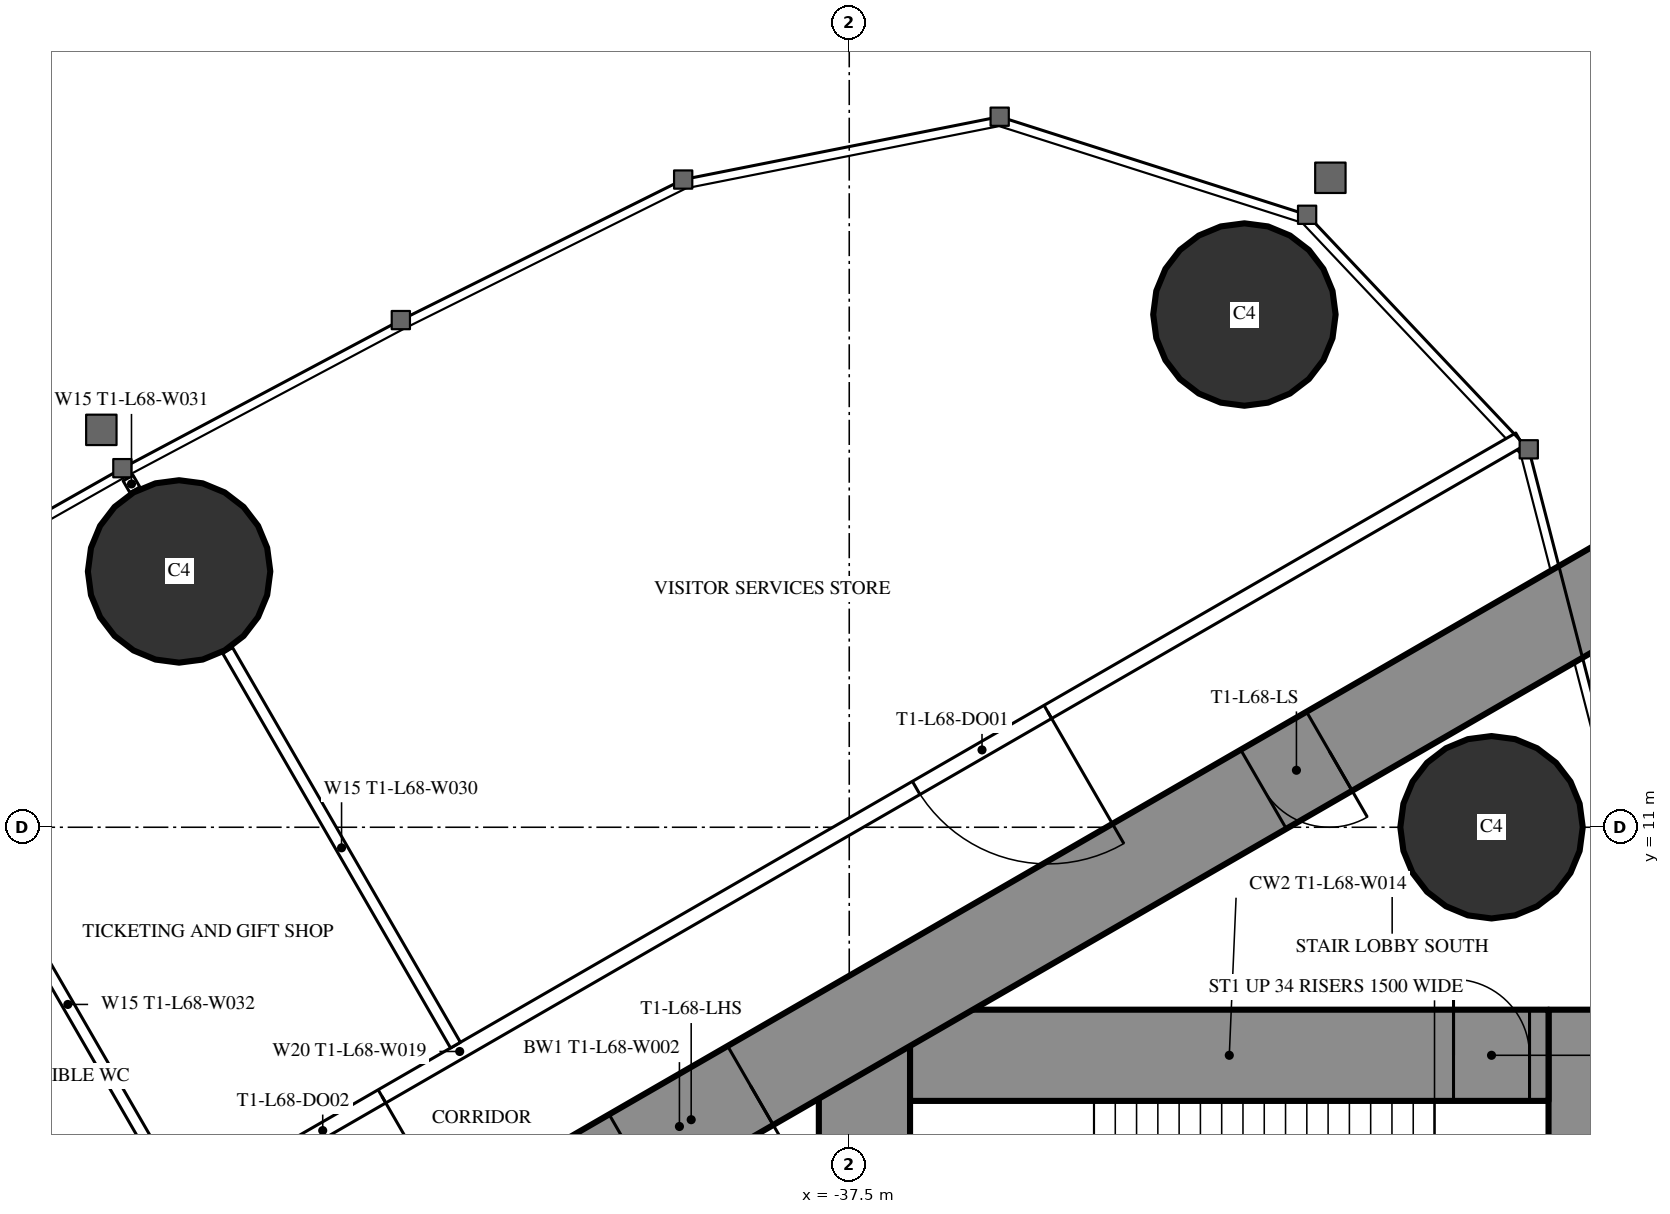
"""IFC4 building model, lengths in metres.
Left out: names, types, materials, properties, quantities, classifications, styles, units other than length and angle.
Written with IfcOpenShell. Run it as: python <this file> out.ifc"""

import sys

from ifc_helpers import new_model, si_unit, direction, frame, frame_2d, origin, origin_2d, place, context, subcontext, project, spatial, rectangle, circle, extrude, element, fill, save


model = new_model("IFC4")
c1 = context("Model", 3, precision=1e-05, world=origin(), true_north=direction((0.0, 1.0)))
c2 = subcontext(c1, "Body", "Model", "MODEL_VIEW")
j1 = project(units=[si_unit("LENGTHUNIT", "METRE"), si_unit("PLANEANGLEUNIT", "RADIAN")], contexts=[c1])
p1 = place(None, origin())
s1 = spatial("IfcSite", under=j1, at=p1, CompositionType="ELEMENT")
p2 = place(p1, origin())
s2 = spatial("IfcBuilding", under=s1, at=p2, CompositionType="ELEMENT")
p3 = place(p2, frame((0.0, 0.0, 257.3)))
s3 = spatial("IfcBuildingStorey", under=s2, at=p3, CompositionType="ELEMENT", Elevation=257.3)
for number, where, z_axis, x_axis in (
    (1, (-32.301, 17.745, 0.0), (0.0, 0.0, 1.0), (1.0, 0.0, 0.0)),
    (2, (-29.05, 11.0, 0.0), (0.0, 0.0, 1.0), (1.0, 0.0, 0.0)),
    (3, (-46.317, 14.365, 0.0), (0.0, 0.0, 1.0), (1.0, 0.0, 0.0)),
):
    element("IfcColumn", number, at=place(p3, frame(where, z_axis=z_axis, x_axis=x_axis)), inside=s3, PredefinedType="COLUMN", context=c2, shape_type="SweptSolid", body=[
        extrude(circle(Radius=1.2, at=origin_2d()), origin(), (0.0, 0.0, 1.0), 6.0),
    ])
p4 = place(p3, frame((-27.9, 8.6, 0.0), z_axis=(0.0, 0.0, 1.0), x_axis=(0.0, -1.0, 0.0)))
e4 = element("IfcWall", 4, at=p4, inside=s3, PredefinedType="SHEAR", context=c2, shape_type="SweptSolid", body=[
    extrude(rectangle(XDim=17.2, YDim=0.8, at=frame_2d((8.6, 0.0))), origin(), (0.0, 0.0, 1.0), 6.0),
])
p5 = place(p4, frame((6.95, 0.0, 0.0)))
e5 = element("IfcOpeningElement", 5, at=p5, cuts=e4, PredefinedType="OPENING", context=c2, shape_type="SweptSolid", body=[
    extrude(rectangle(XDim=0.9, YDim=2.2, at=frame_2d((0.45, 1.1))), frame((0.0, 0.41, 0.0), z_axis=(0.0, -1.0, 0.0), x_axis=(1.0, 0.0, 0.0)), (0.0, 0.0, 1.0), 0.82),
])
p6 = place(p3, frame((-37.3, 8.6, 0.0), z_axis=(0.0, 0.0, 1.0), x_axis=(0.0, -1.0, 0.0)))
e6 = element("IfcWall", 6, at=p6, inside=s3, PredefinedType="SHEAR", context=c2, shape_type="SweptSolid", body=[
    extrude(rectangle(XDim=17.2, YDim=1.2, at=frame_2d((8.6, 0.0))), origin(), (0.0, 0.0, 1.0), 6.0),
])
p7 = place(p6, frame((7.7, 0.0, 0.0)))
e7 = element("IfcOpeningElement", 7, at=p7, cuts=e6, PredefinedType="OPENING", context=c2, shape_type="SweptSolid", body=[
    extrude(rectangle(XDim=1.8, YDim=2.2, at=frame_2d((0.9, 1.1))), frame((0.0, 0.61, 0.0), z_axis=(0.0, -1.0, 0.0), x_axis=(1.0, 0.0, 0.0)), (0.0, 0.0, 1.0), 1.22),
])
p8 = place(p3, frame((-28.3, 8.0, 0.0), z_axis=(0.0, 0.0, 1.0), x_axis=(-1.0, 0.0, 0.0)))
e8 = element("IfcWall", 8, at=p8, inside=s3, PredefinedType="SHEAR", context=c2, shape_type="SweptSolid", body=[
    extrude(rectangle(XDim=8.4, YDim=1.2, at=frame_2d((4.2, 0.0))), origin(), (0.0, 0.0, 1.0), 6.0),
])
p9 = place(p8, frame((0.25, 0.0, 0.0)))
e9 = element("IfcOpeningElement", 9, at=p9, cuts=e8, PredefinedType="OPENING", context=c2, shape_type="SweptSolid", body=[
    extrude(rectangle(XDim=1.0, YDim=2.2, at=frame_2d((0.5, 1.1))), frame((0.0, 0.61, 0.0), z_axis=(0.0, -1.0, 0.0), x_axis=(1.0, 0.0, 0.0)), (0.0, 0.0, 1.0), 1.22),
])
p10 = place(p3, frame((-27.2, 14.3, 0.0), z_axis=(0.0, 0.0, 1.0), x_axis=(-0.866026593062, -0.499997940104, 0.0)))
e10 = element("IfcWall", 10, at=p10, inside=s3, PredefinedType="SHEAR", context=c2, shape_type="SweptSolid", body=[
    extrude(rectangle(XDim=28.946, YDim=1.2, at=frame_2d((14.473, 0.0))), origin(), (0.0, 0.0, 1.0), 6.0),
])
p11 = place(p10, frame((4.6, 0.0, 0.0)))
e11 = element("IfcOpeningElement", 11, at=p11, cuts=e10, PredefinedType="OPENING", context=c2, shape_type="SweptSolid", body=[
    extrude(rectangle(XDim=1.0, YDim=2.2, at=frame_2d((0.5, 1.1))), frame((0.0, 0.61, 0.0), z_axis=(0.0, -1.0, 0.0), x_axis=(1.0, 0.0, 0.0)), (0.0, 0.0, 1.0), 1.22),
])
p12 = place(p10, frame((13.395, 0.0, 0.0)))
e12 = element("IfcOpeningElement", 12, at=p12, cuts=e10, PredefinedType="OPENING", context=c2, shape_type="SweptSolid", body=[
    extrude(rectangle(XDim=1.8, YDim=2.2, at=frame_2d((0.9, 1.1))), frame((0.0, 0.61, 0.0), z_axis=(0.0, -1.0, 0.0), x_axis=(1.0, 0.0, 0.0)), (0.0, 0.0, 1.0), 1.22),
])
p13 = place(p3, frame((-28.681, 16.101, 0.0), z_axis=(0.0, 0.0, 1.0), x_axis=(-0.866024860443, -0.500000941094, 0.0)))
e13 = element("IfcWall", 13, at=p13, inside=s3, PredefinedType="PARTITIONING", context=c2, shape_type="SweptSolid", body=[
    extrude(rectangle(XDim=32.201, YDim=0.2, at=frame_2d((16.101, 0.0))), origin(), (0.0, 0.0, 1.0), 5.75),
])
p14 = place(p13, frame((7.166, 0.0, 0.0)))
e14 = element("IfcOpeningElement", 14, at=p14, cuts=e13, PredefinedType="OPENING", context=c2, shape_type="SweptSolid", body=[
    extrude(rectangle(XDim=2.0, YDim=2.4, at=frame_2d((1.0, 1.2))), frame((0.0, 0.11, 0.0), z_axis=(0.0, -1.0, 0.0), x_axis=(1.0, 0.0, 0.0)), (0.0, 0.0, 1.0), 0.22),
])
p15 = place(p13, frame((17.281, 0.0, 0.0)))
e15 = element("IfcOpeningElement", 15, at=p15, cuts=e13, PredefinedType="OPENING", context=c2, shape_type="SweptSolid", body=[
    extrude(rectangle(XDim=1.8, YDim=2.2, at=frame_2d((0.9, 1.1))), frame((0.0, 0.11, 0.0), z_axis=(0.0, -1.0, 0.0), x_axis=(1.0, 0.0, 0.0)), (0.0, 0.0, 1.0), 0.22),
])
p16 = place(p13, frame((21.43, 0.0, 0.0)))
e16 = element("IfcOpeningElement", 16, at=p16, cuts=e13, PredefinedType="OPENING", context=c2, shape_type="SweptSolid", body=[
    extrude(rectangle(XDim=1.8, YDim=2.2, at=frame_2d((0.9, 1.1))), frame((0.0, 0.11, 0.0), z_axis=(0.0, -1.0, 0.0), x_axis=(1.0, 0.0, 0.0)), (0.0, 0.0, 1.0), 0.22),
])
p17 = place(p13, frame((27.19, 0.0, 0.0)))
e17 = element("IfcOpeningElement", 17, at=p17, cuts=e13, PredefinedType="OPENING", context=c2, shape_type="SweptSolid", body=[
    extrude(rectangle(XDim=2.0, YDim=2.4, at=frame_2d((1.0, 1.2))), frame((0.0, 0.11, 0.0), z_axis=(0.0, -1.0, 0.0), x_axis=(1.0, 0.0, 0.0)), (0.0, 0.0, 1.0), 0.22),
])
p18 = place(p3, frame((-42.68, 8.134, 0.0), z_axis=(0.0, 0.0, 1.0), x_axis=(-0.499984479505, 0.866034364361, 0.0)))
e18 = element("IfcWall", 18, at=p18, inside=s3, PredefinedType="PARTITIONING", context=c2, shape_type="SweptSolid", body=[
    extrude(rectangle(XDim=5.995, YDim=0.15, at=frame_2d((2.998, 0.0))), origin(), (0.0, 0.0, 1.0), 4.85),
])
p19 = place(p3, frame((-46.898, 15.439, 0.0), z_axis=(0.0, 0.0, 1.0), x_axis=(-0.500232303069, 0.865891241997, 0.0)))
e19 = element("IfcWall", 19, at=p19, inside=s3, PredefinedType="PARTITIONING", context=c2, shape_type="SweptSolid", body=[
    extrude(rectangle(XDim=0.18, YDim=0.15, at=frame_2d((0.09, 0.0))), origin(), (0.0, 0.0, 1.0), 4.85),
])
p20 = place(p3, frame((-46.274, 6.059, 0.0), z_axis=(0.0, 0.0, 1.0), x_axis=(-0.500020471368, 0.866013584312, 0.0)))
e20 = element("IfcWall", 20, at=p20, inside=s3, PredefinedType="PARTITIONING", context=c2, shape_type="SweptSolid", body=[
    extrude(rectangle(XDim=6.028, YDim=0.15, at=frame_2d((3.014, 0.0))), origin(), (0.0, 0.0, 1.0), 4.85),
])
p21 = place(p14, origin())
e21 = element("IfcDoor", 21, at=p21, inside=s3, OperationType="DOUBLE_DOOR_SINGLE_SWING", PredefinedType="DOOR", context=c2, shape_type="SweptSolid", body=[
    extrude(rectangle(XDim=2.0, YDim=2.4, at=frame_2d((1.0, 1.2))), frame((0.0, 0.025, 0.0), z_axis=(0.0, -1.0, 0.0), x_axis=(1.0, 0.0, 0.0)), (0.0, 0.0, 1.0), 0.05),
])
fill(e14, e21)
p22 = place(p15, origin())
e22 = element("IfcDoor", 22, at=p22, inside=s3, OperationType="DOUBLE_DOOR_SINGLE_SWING", PredefinedType="DOOR", context=c2, shape_type="SweptSolid", body=[
    extrude(rectangle(XDim=1.8, YDim=2.2, at=frame_2d((0.9, 1.1))), frame((0.0, 0.025, 0.0), z_axis=(0.0, -1.0, 0.0), x_axis=(1.0, 0.0, 0.0)), (0.0, 0.0, 1.0), 0.05),
])
fill(e15, e22)
p23 = place(p11, origin())
e23 = element("IfcDoor", 23, at=p23, inside=s3, OperationType="SINGLE_SWING_LEFT", PredefinedType="DOOR", context=c2, shape_type="SweptSolid", body=[
    extrude(rectangle(XDim=1.0, YDim=2.2, at=frame_2d((0.5, 1.1))), frame((0.0, 0.025, 0.0), z_axis=(0.0, -1.0, 0.0), x_axis=(1.0, 0.0, 0.0)), (0.0, 0.0, 1.0), 0.05),
])
fill(e11, e23)
p24 = place(p12, origin())
e24 = element("IfcDoor", 24, at=p24, inside=s3, OperationType="DOUBLE_DOOR_SINGLE_SWING", PredefinedType="DOOR", context=c2, shape_type="SweptSolid", body=[
    extrude(rectangle(XDim=1.8, YDim=2.2, at=frame_2d((0.9, 1.1))), frame((0.0, 0.025, 0.0), z_axis=(0.0, -1.0, 0.0), x_axis=(1.0, 0.0, 0.0)), (0.0, 0.0, 1.0), 0.05),
])
fill(e12, e24)
p25 = place(p9, origin())
e25 = element("IfcDoor", 25, at=p25, inside=s3, OperationType="SINGLE_SWING_RIGHT", PredefinedType="DOOR", context=c2, shape_type="SweptSolid", body=[
    extrude(rectangle(XDim=1.0, YDim=2.2, at=frame_2d((0.5, 1.1))), frame((0.0, 0.025, 0.0), z_axis=(0.0, -1.0, 0.0), x_axis=(1.0, 0.0, 0.0)), (0.0, 0.0, 1.0), 0.05),
])
fill(e9, e25)
save(model, sys.argv[1])
